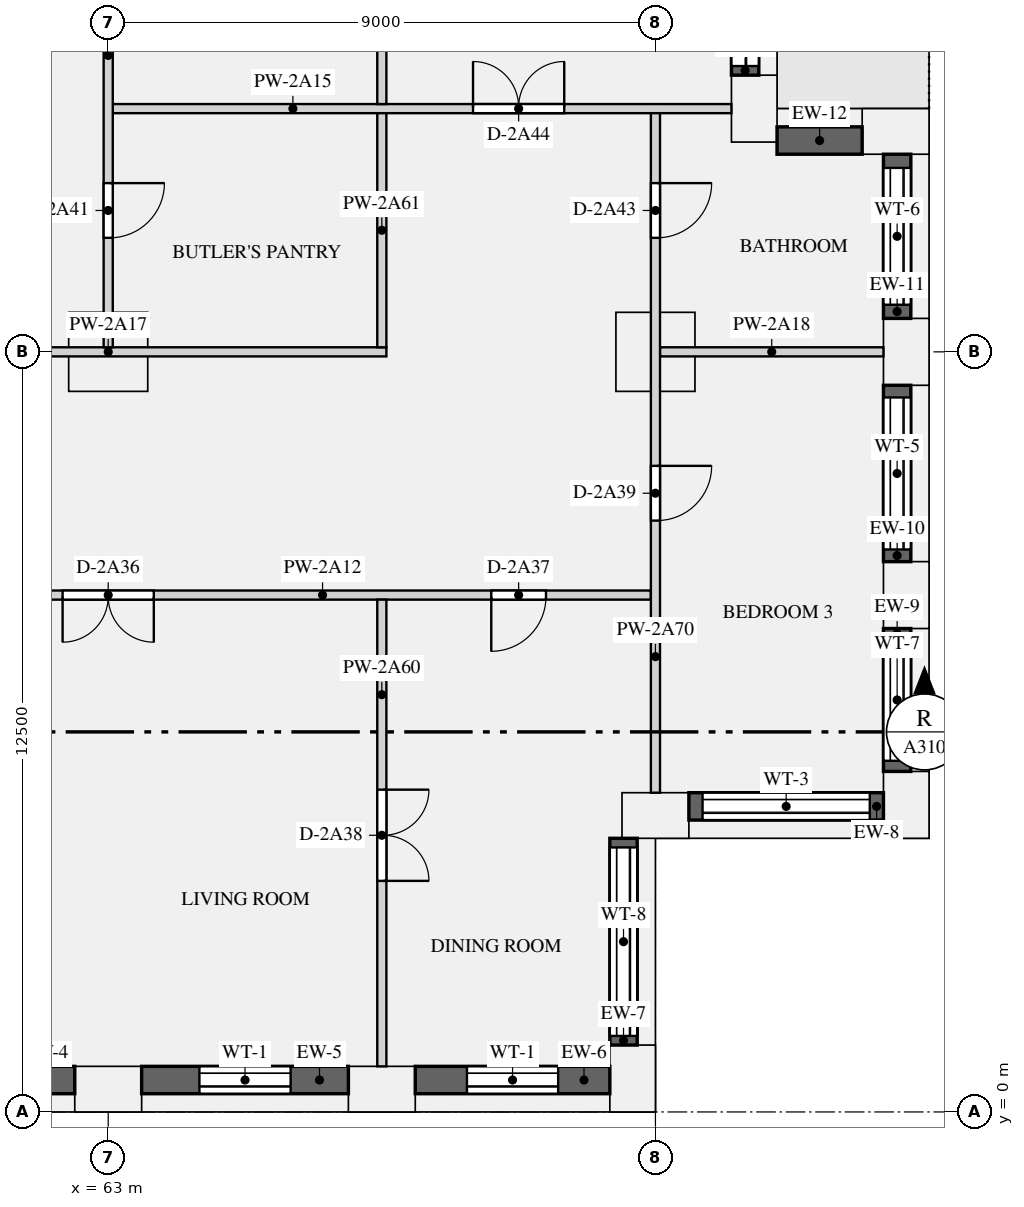
"""IFC4 building model, lengths in metres.
Left out: names, types, materials, properties, quantities, classifications, styles, units other than length and angle.
Written with IfcOpenShell. Run it as: python <this file> out.ifc"""

import sys

from ifc_helpers import new_model, si_unit, direction, frame, frame_2d, origin, origin_2d, place, context, subcontext, project, spatial, rectangle, extrude, element, fill, save


model = new_model("IFC4")
c1 = context("Model", 3, precision=1e-05, world=origin(), true_north=direction((0.0, 1.0)))
c2 = subcontext(c1, "Body", "Model", "MODEL_VIEW")
j1 = project(units=[si_unit("LENGTHUNIT", "METRE"), si_unit("PLANEANGLEUNIT", "RADIAN")], contexts=[c1])
p1 = place(None, origin())
s1 = spatial("IfcSite", under=j1, at=p1, CompositionType="ELEMENT")
p2 = place(p1, origin())
s2 = spatial("IfcBuilding", under=s1, at=p2, CompositionType="ELEMENT")
p3 = place(p2, frame((0.0, 0.0, 83.55)))
s3 = spatial("IfcBuildingStorey", under=s2, at=p3, CompositionType="ELEMENT", Elevation=83.55)
for number, where, z_axis, x_axis in (
    (1, (63.0, 0.375, 0.0), (0.0, 0.0, 1.0), (1.0, 0.0, 0.0)),
    (2, (67.5, 0.375, 0.0), (0.0, 0.0, 1.0), (1.0, 0.0, 0.0)),
    (3, (71.625, 0.55, 0.0), (0.0, 0.0, 1.0), (0.0, 1.0, 0.0)),
    (4, (72.0, 4.875, 0.0), (0.0, 0.0, 1.0), (1.0, 0.0, 0.0)),
    (5, (76.125, 5.05, 0.0), (0.0, 0.0, 1.0), (0.0, 1.0, 0.0)),
    (6, (76.125, 8.5, 0.0), (0.0, 0.0, 1.0), (0.0, 1.0, 0.0)),
    (7, (76.125, 12.5, 0.0), (0.0, 0.0, 1.0), (0.0, 1.0, 0.0)),
    (8, (75.95, 16.125, 0.0), (0.0, 0.0, 1.0), (-1.0, 0.0, 0.0)),
    (9, (73.625, 16.5, 0.0), (0.0, 0.0, 1.0), (0.0, 1.0, 0.0)),
):
    element("IfcColumn", number, at=place(p3, frame(where, z_axis=z_axis, x_axis=x_axis)), inside=s3, PredefinedType="USERDEFINED", context=c2, shape_type="SweptSolid", body=[
        extrude(rectangle(XDim=1.1, YDim=0.75, at=origin_2d()), origin(), (0.0, 0.0, 1.0), 3.15),
    ])
for number, where, z_axis, x_axis in (
    (10, (63.0, 12.5, 0.0), (0.0, 0.0, 1.0), (1.0, 0.0, 0.0)),
    (11, (72.0, 12.5, 0.0), (0.0, 0.0, 1.0), (1.0, 0.0, 0.0)),
):
    element("IfcColumn", number, at=place(p3, frame(where, z_axis=z_axis, x_axis=x_axis)), inside=s3, PredefinedType="COLUMN", context=c2, shape_type="SweptSolid", body=[
        extrude(rectangle(XDim=1.3, YDim=1.3, at=origin_2d()), origin(), (0.0, 0.0, 1.0), 3.15),
    ])
p4 = place(p3, frame((59.05, 0.525, 0.9), z_axis=(0.0, 0.0, 1.0), x_axis=(1.0, 0.0, 0.0)))
e12 = element("IfcWall", 12, at=p4, inside=s3, PredefinedType="SOLIDWALL", context=c2, shape_type="SweptSolid", body=[
    extrude(rectangle(XDim=3.4, YDim=0.45, at=frame_2d((1.7, 0.0))), origin(), (0.0, 0.0, 1.0), 1.93),
])
p5 = place(p4, frame((0.95, 0.0, 0.15)))
e13 = element("IfcOpeningElement", 13, at=p5, cuts=e12, PredefinedType="OPENING", context=c2, shape_type="SweptSolid", body=[
    extrude(rectangle(XDim=1.5, YDim=1.5, at=frame_2d((0.75, 0.75))), frame((0.0, 0.235, 0.0), z_axis=(0.0, -1.0, 0.0), x_axis=(1.0, 0.0, 0.0)), (0.0, 0.0, 1.0), 0.47),
])
p6 = place(p3, frame((63.55, 0.525, 0.9), z_axis=(0.0, 0.0, 1.0), x_axis=(1.0, 0.0, 0.0)))
e14 = element("IfcWall", 14, at=p6, inside=s3, PredefinedType="SOLIDWALL", context=c2, shape_type="SweptSolid", body=[
    extrude(rectangle(XDim=3.4, YDim=0.45, at=frame_2d((1.7, 0.0))), origin(), (0.0, 0.0, 1.0), 1.93),
])
p7 = place(p6, frame((0.95, 0.0, 0.15)))
e15 = element("IfcOpeningElement", 15, at=p7, cuts=e14, PredefinedType="OPENING", context=c2, shape_type="SweptSolid", body=[
    extrude(rectangle(XDim=1.5, YDim=1.5, at=frame_2d((0.75, 0.75))), frame((0.0, 0.235, 0.0), z_axis=(0.0, -1.0, 0.0), x_axis=(1.0, 0.0, 0.0)), (0.0, 0.0, 1.0), 0.47),
])
p8 = place(p3, frame((68.05, 0.525, 0.9), z_axis=(0.0, 0.0, 1.0), x_axis=(1.0, 0.0, 0.0)))
e16 = element("IfcWall", 16, at=p8, inside=s3, PredefinedType="SOLIDWALL", context=c2, shape_type="SweptSolid", body=[
    extrude(rectangle(XDim=3.2, YDim=0.45, at=frame_2d((1.6, 0.0))), origin(), (0.0, 0.0, 1.0), 1.93),
])
p9 = place(p8, frame((0.85, 0.0, 0.15)))
e17 = element("IfcOpeningElement", 17, at=p9, cuts=e16, PredefinedType="OPENING", context=c2, shape_type="SweptSolid", body=[
    extrude(rectangle(XDim=1.5, YDim=1.5, at=frame_2d((0.75, 0.75))), frame((0.0, 0.235, 0.0), z_axis=(0.0, -1.0, 0.0), x_axis=(1.0, 0.0, 0.0)), (0.0, 0.0, 1.0), 0.47),
])
p10 = place(p3, frame((71.475, 1.1, 0.9), z_axis=(0.0, 0.0, 1.0), x_axis=(0.0, 1.0, 0.0)))
e18 = element("IfcWall", 18, at=p10, inside=s3, PredefinedType="SOLIDWALL", context=c2, shape_type="SweptSolid", body=[
    extrude(rectangle(XDim=3.4, YDim=0.45, at=frame_2d((1.7, 0.0))), origin(), (0.0, 0.0, 1.0), 1.93),
])
p11 = place(p10, frame((0.15, 0.0, 0.15)))
e19 = element("IfcOpeningElement", 19, at=p11, cuts=e18, PredefinedType="OPENING", context=c2, shape_type="SweptSolid", body=[
    extrude(rectangle(XDim=3.1, YDim=1.5, at=frame_2d((1.55, 0.75))), frame((0.0, 0.235, 0.0), z_axis=(0.0, -1.0, 0.0), x_axis=(1.0, 0.0, 0.0)), (0.0, 0.0, 1.0), 0.47),
])
p12 = place(p3, frame((72.55, 5.025, 0.9), z_axis=(0.0, 0.0, 1.0), x_axis=(1.0, 0.0, 0.0)))
e20 = element("IfcWall", 20, at=p12, inside=s3, PredefinedType="SOLIDWALL", context=c2, shape_type="SweptSolid", body=[
    extrude(rectangle(XDim=3.2, YDim=0.45, at=frame_2d((1.6, 0.0))), origin(), (0.0, 0.0, 1.0), 1.93),
])
p13 = place(p12, frame((0.225, 0.0, 0.15)))
e21 = element("IfcOpeningElement", 21, at=p13, cuts=e20, PredefinedType="OPENING", context=c2, shape_type="SweptSolid", body=[
    extrude(rectangle(XDim=2.75, YDim=1.5, at=frame_2d((1.375, 0.75))), frame((0.0, 0.235, 0.0), z_axis=(0.0, -1.0, 0.0), x_axis=(1.0, 0.0, 0.0)), (0.0, 0.0, 1.0), 0.47),
])
p14 = place(p3, frame((75.975, 5.6, 0.9), z_axis=(0.0, 0.0, 1.0), x_axis=(0.0, 1.0, 0.0)))
e22 = element("IfcWall", 22, at=p14, inside=s3, PredefinedType="SOLIDWALL", context=c2, shape_type="SweptSolid", body=[
    extrude(rectangle(XDim=2.35, YDim=0.45, at=frame_2d((1.175, 0.0))), origin(), (0.0, 0.0, 1.0), 1.93),
])
p15 = place(p14, frame((0.175, 0.0, 0.15)))
e23 = element("IfcOpeningElement", 23, at=p15, cuts=e22, PredefinedType="OPENING", context=c2, shape_type="SweptSolid", body=[
    extrude(rectangle(XDim=2.0, YDim=1.5, at=frame_2d((1.0, 0.75))), frame((0.0, 0.235, 0.0), z_axis=(0.0, -1.0, 0.0), x_axis=(1.0, 0.0, 0.0)), (0.0, 0.0, 1.0), 0.47),
])
p16 = place(p3, frame((75.975, 9.05, 0.9), z_axis=(0.0, 0.0, 1.0), x_axis=(0.0, 1.0, 0.0)))
e24 = element("IfcWall", 24, at=p16, inside=s3, PredefinedType="SOLIDWALL", context=c2, shape_type="SweptSolid", body=[
    extrude(rectangle(XDim=2.9, YDim=0.45, at=frame_2d((1.45, 0.0))), origin(), (0.0, 0.0, 1.0), 1.93),
])
p17 = place(p16, frame((0.2, 0.0, 0.15)))
e25 = element("IfcOpeningElement", 25, at=p17, cuts=e24, PredefinedType="OPENING", context=c2, shape_type="SweptSolid", body=[
    extrude(rectangle(XDim=2.5, YDim=1.5, at=frame_2d((1.25, 0.75))), frame((0.0, 0.235, 0.0), z_axis=(0.0, -1.0, 0.0), x_axis=(1.0, 0.0, 0.0)), (0.0, 0.0, 1.0), 0.47),
])
p18 = place(p3, frame((75.975, 13.05, 0.9), z_axis=(0.0, 0.0, 1.0), x_axis=(0.0, 1.0, 0.0)))
e26 = element("IfcWall", 26, at=p18, inside=s3, PredefinedType="SOLIDWALL", context=c2, shape_type="SweptSolid", body=[
    extrude(rectangle(XDim=2.7, YDim=0.45, at=frame_2d((1.35, 0.0))), origin(), (0.0, 0.0, 1.0), 1.93),
])
p19 = place(p18, frame((0.225, 0.0, 0.15)))
e27 = element("IfcOpeningElement", 27, at=p19, cuts=e26, PredefinedType="OPENING", context=c2, shape_type="SweptSolid", body=[
    extrude(rectangle(XDim=2.25, YDim=1.5, at=frame_2d((1.125, 0.75))), frame((0.0, 0.235, 0.0), z_axis=(0.0, -1.0, 0.0), x_axis=(1.0, 0.0, 0.0)), (0.0, 0.0, 1.0), 0.47),
])
p20 = place(p3, frame((75.4, 15.975, 0.9), z_axis=(0.0, 0.0, 1.0), x_axis=(-1.0, 0.0, 0.0)))
e28 = element("IfcWall", 28, at=p20, inside=s3, PredefinedType="SOLIDWALL", context=c2, shape_type="SweptSolid", body=[
    extrude(rectangle(XDim=1.4, YDim=0.45, at=frame_2d((0.7, 0.0))), origin(), (0.0, 0.0, 1.0), 1.93),
])
p21 = place(p3, frame((73.475, 17.05, 0.0), z_axis=(0.0, 0.0, 1.0), x_axis=(0.0, 1.0, 0.0)))
e29 = element("IfcWall", 29, at=p21, inside=s3, PredefinedType="SOLIDWALL", context=c2, shape_type="SweptSolid", body=[
    extrude(rectangle(XDim=2.9, YDim=0.45, at=frame_2d((1.45, 0.0))), origin(), (0.0, 0.0, 1.0), 2.83),
])
p22 = place(p21, frame((0.15, 0.0, 0.0)))
e30 = element("IfcOpeningElement", 30, at=p22, cuts=e29, PredefinedType="OPENING", context=c2, shape_type="SweptSolid", body=[
    extrude(rectangle(XDim=2.6, YDim=2.3, at=frame_2d((1.3, 1.15))), frame((0.0, 0.235, 0.0), z_axis=(0.0, -1.0, 0.0), x_axis=(1.0, 0.0, 0.0)), (0.0, 0.0, 1.0), 0.47),
])
p23 = place(p3, frame((54.0, 8.5, 0.0), z_axis=(0.0, 0.0, 1.0), x_axis=(1.0, 0.0, 0.0)))
e31 = element("IfcWall", 31, at=p23, inside=s3, PredefinedType="PARTITIONING", context=c2, shape_type="SweptSolid", body=[
    extrude(rectangle(XDim=17.925, YDim=0.15, at=frame_2d((8.962, 0.0))), origin(), (0.0, 0.0, 1.0), 2.83),
])
p24 = place(p23, frame((1.8, 0.0, 0.0)))
e32 = element("IfcOpeningElement", 32, at=p24, cuts=e31, PredefinedType="OPENING", context=c2, shape_type="SweptSolid", body=[
    extrude(rectangle(XDim=0.9, YDim=2.1, at=frame_2d((0.45, 1.05))), frame((0.0, 0.085, 0.0), z_axis=(0.0, -1.0, 0.0), x_axis=(1.0, 0.0, 0.0)), (0.0, 0.0, 1.0), 0.17),
])
p25 = place(p23, frame((8.25, 0.0, 0.0)))
e33 = element("IfcOpeningElement", 33, at=p25, cuts=e31, PredefinedType="OPENING", context=c2, shape_type="SweptSolid", body=[
    extrude(rectangle(XDim=1.5, YDim=2.1, at=frame_2d((0.75, 1.05))), frame((0.0, 0.085, 0.0), z_axis=(0.0, -1.0, 0.0), x_axis=(1.0, 0.0, 0.0)), (0.0, 0.0, 1.0), 0.17),
])
p26 = place(p23, frame((15.3, 0.0, 0.0)))
e34 = element("IfcOpeningElement", 34, at=p26, cuts=e31, PredefinedType="OPENING", context=c2, shape_type="SweptSolid", body=[
    extrude(rectangle(XDim=0.9, YDim=2.1, at=frame_2d((0.45, 1.05))), frame((0.0, 0.085, 0.0), z_axis=(0.0, -1.0, 0.0), x_axis=(1.0, 0.0, 0.0)), (0.0, 0.0, 1.0), 0.17),
])
p27 = place(p3, frame((63.075, 16.5, 0.0), z_axis=(0.0, 0.0, 1.0), x_axis=(1.0, 0.0, 0.0)))
e35 = element("IfcWall", 35, at=p27, inside=s3, PredefinedType="PARTITIONING", context=c2, shape_type="SweptSolid", body=[
    extrude(rectangle(XDim=10.175, YDim=0.15, at=frame_2d((5.087, 0.0))), origin(), (0.0, 0.0, 1.0), 2.83),
])
p28 = place(p27, frame((5.925, 0.0, 0.0)))
e36 = element("IfcOpeningElement", 36, at=p28, cuts=e35, PredefinedType="OPENING", context=c2, shape_type="SweptSolid", body=[
    extrude(rectangle(XDim=1.5, YDim=2.1, at=frame_2d((0.75, 1.05))), frame((0.0, 0.085, 0.0), z_axis=(0.0, -1.0, 0.0), x_axis=(1.0, 0.0, 0.0)), (0.0, 0.0, 1.0), 0.17),
])
p29 = place(p3, frame((58.425, 12.5, 0.0), z_axis=(0.0, 0.0, 1.0), x_axis=(1.0, 0.0, 0.0)))
e37 = element("IfcWall", 37, at=p29, inside=s3, PredefinedType="PARTITIONING", context=c2, shape_type="SweptSolid", body=[
    extrude(rectangle(XDim=9.15, YDim=0.15, at=frame_2d((4.575, 0.0))), origin(), (0.0, 0.0, 1.0), 2.83),
])
p30 = place(p3, frame((72.075, 12.5, 0.0), z_axis=(0.0, 0.0, 1.0), x_axis=(1.0, 0.0, 0.0)))
e38 = element("IfcWall", 38, at=p30, inside=s3, PredefinedType="PARTITIONING", context=c2, shape_type="SweptSolid", body=[
    extrude(rectangle(XDim=3.675, YDim=0.15, at=frame_2d((1.837, 0.0))), origin(), (0.0, 0.0, 1.0), 2.83),
])
p31 = place(p3, frame((67.5, 0.75, 0.0), z_axis=(0.0, 0.0, 1.0), x_axis=(0.0, 1.0, 0.0)))
e39 = element("IfcWall", 39, at=p31, inside=s3, PredefinedType="PARTITIONING", context=c2, shape_type="SweptSolid", body=[
    extrude(rectangle(XDim=7.675, YDim=0.15, at=frame_2d((3.837, 0.0))), origin(), (0.0, 0.0, 1.0), 2.83),
])
p32 = place(p31, frame((3.05, 0.0, 0.0)))
e40 = element("IfcOpeningElement", 40, at=p32, cuts=e39, PredefinedType="OPENING", context=c2, shape_type="SweptSolid", body=[
    extrude(rectangle(XDim=1.5, YDim=2.1, at=frame_2d((0.75, 1.05))), frame((0.0, 0.085, 0.0), z_axis=(0.0, -1.0, 0.0), x_axis=(1.0, 0.0, 0.0)), (0.0, 0.0, 1.0), 0.17),
])
p33 = place(p3, frame((67.5, 12.575, 0.0), z_axis=(0.0, 0.0, 1.0), x_axis=(0.0, 1.0, 0.0)))
e41 = element("IfcWall", 41, at=p33, inside=s3, PredefinedType="PARTITIONING", context=c2, shape_type="SweptSolid", body=[
    extrude(rectangle(XDim=3.85, YDim=0.15, at=frame_2d((1.925, 0.0))), origin(), (0.0, 0.0, 1.0), 2.83),
])
p34 = place(p3, frame((67.5, 16.575, 0.0), z_axis=(0.0, 0.0, 1.0), x_axis=(0.0, 1.0, 0.0)))
e42 = element("IfcWall", 42, at=p34, inside=s3, PredefinedType="PARTITIONING", context=c2, shape_type="SweptSolid", body=[
    extrude(rectangle(XDim=7.85, YDim=0.15, at=frame_2d((3.925, 0.0))), origin(), (0.0, 0.0, 1.0), 2.83),
])
p35 = place(p3, frame((63.0, 12.575, 0.0), z_axis=(0.0, 0.0, 1.0), x_axis=(0.0, 1.0, 0.0)))
e43 = element("IfcWall", 43, at=p35, inside=s3, PredefinedType="PARTITIONING", context=c2, shape_type="SweptSolid", body=[
    extrude(rectangle(XDim=11.325, YDim=0.15, at=frame_2d((5.663, 0.0))), origin(), (0.0, 0.0, 1.0), 2.83),
])
p36 = place(p35, frame((1.8, 0.0, 0.0)))
e44 = element("IfcOpeningElement", 44, at=p36, cuts=e43, PredefinedType="OPENING", context=c2, shape_type="SweptSolid", body=[
    extrude(rectangle(XDim=0.9, YDim=2.1, at=frame_2d((0.45, 1.05))), frame((0.0, 0.085, 0.0), z_axis=(0.0, -1.0, 0.0), x_axis=(1.0, 0.0, 0.0)), (0.0, 0.0, 1.0), 0.17),
])
p37 = place(p35, frame((6.9, 0.0, 0.0)))
e45 = element("IfcOpeningElement", 45, at=p37, cuts=e43, PredefinedType="OPENING", context=c2, shape_type="SweptSolid", body=[
    extrude(rectangle(XDim=0.9, YDim=2.1, at=frame_2d((0.45, 1.05))), frame((0.0, 0.085, 0.0), z_axis=(0.0, -1.0, 0.0), x_axis=(1.0, 0.0, 0.0)), (0.0, 0.0, 1.0), 0.17),
])
p38 = place(p3, frame((72.0, 5.25, 0.0), z_axis=(0.0, 0.0, 1.0), x_axis=(0.0, 1.0, 0.0)))
e46 = element("IfcWall", 46, at=p38, inside=s3, PredefinedType="PARTITIONING", context=c2, shape_type="SweptSolid", body=[
    extrude(rectangle(XDim=11.175, YDim=0.15, at=frame_2d((5.587, 0.0))), origin(), (0.0, 0.0, 1.0), 2.83),
])
p39 = place(p38, frame((4.475, 0.0, 0.0)))
e47 = element("IfcOpeningElement", 47, at=p39, cuts=e46, PredefinedType="OPENING", context=c2, shape_type="SweptSolid", body=[
    extrude(rectangle(XDim=0.9, YDim=2.1, at=frame_2d((0.45, 1.05))), frame((0.0, 0.085, 0.0), z_axis=(0.0, -1.0, 0.0), x_axis=(1.0, 0.0, 0.0)), (0.0, 0.0, 1.0), 0.17),
])
p40 = place(p38, frame((9.125, 0.0, 0.0)))
e48 = element("IfcOpeningElement", 48, at=p40, cuts=e46, PredefinedType="OPENING", context=c2, shape_type="SweptSolid", body=[
    extrude(rectangle(XDim=0.9, YDim=2.1, at=frame_2d((0.45, 1.05))), frame((0.0, 0.085, 0.0), z_axis=(0.0, -1.0, 0.0), x_axis=(1.0, 0.0, 0.0)), (0.0, 0.0, 1.0), 0.17),
])
p41 = place(p7, origin())
e49 = element("IfcWindow", 49, at=p41, inside=s3, PartitioningType="SINGLE_PANEL", PredefinedType="WINDOW", context=c2, shape_type="SweptSolid", body=[
    extrude(rectangle(XDim=1.5, YDim=1.5, at=frame_2d((0.75, 0.75))), frame((0.0, -0.065, 0.0), z_axis=(0.0, -1.0, 0.0), x_axis=(1.0, 0.0, 0.0)), (0.0, 0.0, 1.0), 0.06),
])
fill(e15, e49)
p42 = place(p9, origin())
e50 = element("IfcWindow", 50, at=p42, inside=s3, PartitioningType="SINGLE_PANEL", PredefinedType="WINDOW", context=c2, shape_type="SweptSolid", body=[
    extrude(rectangle(XDim=1.5, YDim=1.5, at=frame_2d((0.75, 0.75))), frame((0.0, -0.065, 0.0), z_axis=(0.0, -1.0, 0.0), x_axis=(1.0, 0.0, 0.0)), (0.0, 0.0, 1.0), 0.06),
])
fill(e17, e50)
p43 = place(p11, origin())
e51 = element("IfcWindow", 51, at=p43, inside=s3, PartitioningType="SINGLE_PANEL", PredefinedType="WINDOW", context=c2, shape_type="SweptSolid", body=[
    extrude(rectangle(XDim=3.1, YDim=1.5, at=frame_2d((1.55, 0.75))), frame((0.0, -0.065, 0.0), z_axis=(0.0, -1.0, 0.0), x_axis=(1.0, 0.0, 0.0)), (0.0, 0.0, 1.0), 0.06),
])
fill(e19, e51)
p44 = place(p13, origin())
e52 = element("IfcWindow", 52, at=p44, inside=s3, PartitioningType="SINGLE_PANEL", PredefinedType="WINDOW", context=c2, shape_type="SweptSolid", body=[
    extrude(rectangle(XDim=2.75, YDim=1.5, at=frame_2d((1.375, 0.75))), frame((0.0, -0.065, 0.0), z_axis=(0.0, -1.0, 0.0), x_axis=(1.0, 0.0, 0.0)), (0.0, 0.0, 1.0), 0.06),
])
fill(e21, e52)
p45 = place(p15, origin())
e53 = element("IfcWindow", 53, at=p45, inside=s3, PartitioningType="SINGLE_PANEL", PredefinedType="WINDOW", context=c2, shape_type="SweptSolid", body=[
    extrude(rectangle(XDim=2.0, YDim=1.5, at=frame_2d((1.0, 0.75))), frame((0.0, -0.065, 0.0), z_axis=(0.0, -1.0, 0.0), x_axis=(1.0, 0.0, 0.0)), (0.0, 0.0, 1.0), 0.06),
])
fill(e23, e53)
p46 = place(p17, origin())
e54 = element("IfcWindow", 54, at=p46, inside=s3, PartitioningType="SINGLE_PANEL", PredefinedType="WINDOW", context=c2, shape_type="SweptSolid", body=[
    extrude(rectangle(XDim=2.5, YDim=1.5, at=frame_2d((1.25, 0.75))), frame((0.0, -0.065, 0.0), z_axis=(0.0, -1.0, 0.0), x_axis=(1.0, 0.0, 0.0)), (0.0, 0.0, 1.0), 0.06),
])
fill(e25, e54)
p47 = place(p19, origin())
e55 = element("IfcWindow", 55, at=p47, inside=s3, PartitioningType="SINGLE_PANEL", PredefinedType="WINDOW", context=c2, shape_type="SweptSolid", body=[
    extrude(rectangle(XDim=2.25, YDim=1.5, at=frame_2d((1.125, 0.75))), frame((0.0, -0.065, 0.0), z_axis=(0.0, -1.0, 0.0), x_axis=(1.0, 0.0, 0.0)), (0.0, 0.0, 1.0), 0.06),
])
fill(e27, e55)
p48 = place(p22, origin())
e56 = element("IfcDoor", 56, at=p48, inside=s3, OperationType="SLIDING_TO_LEFT", PredefinedType="DOOR", context=c2, shape_type="SweptSolid", body=[
    extrude(rectangle(XDim=2.6, YDim=2.3, at=frame_2d((1.3, 1.15))), frame((0.0, -0.07, 0.0), z_axis=(0.0, -1.0, 0.0), x_axis=(1.0, 0.0, 0.0)), (0.0, 0.0, 1.0), 0.05),
])
fill(e30, e56)
p49 = place(p25, frame((1.5, 0.0, 0.0), z_axis=(0.0, 0.0, 1.0), x_axis=(-1.0, 0.0, 0.0)))
e57 = element("IfcDoor", 57, at=p49, inside=s3, OperationType="DOUBLE_DOOR_SINGLE_SWING", PredefinedType="DOOR", context=c2, shape_type="SweptSolid", body=[
    extrude(rectangle(XDim=1.5, YDim=2.1, at=frame_2d((0.75, 1.05))), frame((0.0, 0.025, 0.0), z_axis=(0.0, -1.0, 0.0), x_axis=(1.0, 0.0, 0.0)), (0.0, 0.0, 1.0), 0.05),
])
fill(e33, e57)
p50 = place(p26, frame((0.9, 0.0, 0.0), z_axis=(0.0, 0.0, 1.0), x_axis=(-1.0, 0.0, 0.0)))
e58 = element("IfcDoor", 58, at=p50, inside=s3, OperationType="SINGLE_SWING_RIGHT", PredefinedType="DOOR", context=c2, shape_type="SweptSolid", body=[
    extrude(rectangle(XDim=0.9, YDim=2.1, at=frame_2d((0.45, 1.05))), frame((0.0, 0.025, 0.0), z_axis=(0.0, -1.0, 0.0), x_axis=(1.0, 0.0, 0.0)), (0.0, 0.0, 1.0), 0.05),
])
fill(e34, e58)
p51 = place(p32, frame((1.5, 0.0, 0.0), z_axis=(0.0, 0.0, 1.0), x_axis=(-1.0, 0.0, 0.0)))
e59 = element("IfcDoor", 59, at=p51, inside=s3, OperationType="DOUBLE_DOOR_SINGLE_SWING", PredefinedType="DOOR", context=c2, shape_type="SweptSolid", body=[
    extrude(rectangle(XDim=1.5, YDim=2.1, at=frame_2d((0.75, 1.05))), frame((0.0, 0.025, 0.0), z_axis=(0.0, -1.0, 0.0), x_axis=(1.0, 0.0, 0.0)), (0.0, 0.0, 1.0), 0.05),
])
fill(e40, e59)
p52 = place(p39, frame((0.9, 0.0, 0.0), z_axis=(0.0, 0.0, 1.0), x_axis=(-1.0, 0.0, 0.0)))
e60 = element("IfcDoor", 60, at=p52, inside=s3, OperationType="SINGLE_SWING_LEFT", PredefinedType="DOOR", context=c2, shape_type="SweptSolid", body=[
    extrude(rectangle(XDim=0.9, YDim=2.1, at=frame_2d((0.45, 1.05))), frame((0.0, 0.025, 0.0), z_axis=(0.0, -1.0, 0.0), x_axis=(1.0, 0.0, 0.0)), (0.0, 0.0, 1.0), 0.05),
])
fill(e47, e60)
p53 = place(p36, frame((0.9, 0.0, 0.0), z_axis=(0.0, 0.0, 1.0), x_axis=(-1.0, 0.0, 0.0)))
e61 = element("IfcDoor", 61, at=p53, inside=s3, OperationType="SINGLE_SWING_LEFT", PredefinedType="DOOR", context=c2, shape_type="SweptSolid", body=[
    extrude(rectangle(XDim=0.9, YDim=2.1, at=frame_2d((0.45, 1.05))), frame((0.0, 0.025, 0.0), z_axis=(0.0, -1.0, 0.0), x_axis=(1.0, 0.0, 0.0)), (0.0, 0.0, 1.0), 0.05),
])
fill(e44, e61)
p54 = place(p40, frame((0.9, 0.0, 0.0), z_axis=(0.0, 0.0, 1.0), x_axis=(-1.0, 0.0, 0.0)))
e62 = element("IfcDoor", 62, at=p54, inside=s3, OperationType="SINGLE_SWING_LEFT", PredefinedType="DOOR", context=c2, shape_type="SweptSolid", body=[
    extrude(rectangle(XDim=0.9, YDim=2.1, at=frame_2d((0.45, 1.05))), frame((0.0, 0.025, 0.0), z_axis=(0.0, -1.0, 0.0), x_axis=(1.0, 0.0, 0.0)), (0.0, 0.0, 1.0), 0.05),
])
fill(e48, e62)
p55 = place(p28, origin())
e63 = element("IfcDoor", 63, at=p55, inside=s3, OperationType="DOUBLE_DOOR_SINGLE_SWING", PredefinedType="DOOR", context=c2, shape_type="SweptSolid", body=[
    extrude(rectangle(XDim=1.5, YDim=2.1, at=frame_2d((0.75, 1.05))), frame((0.0, 0.025, 0.0), z_axis=(0.0, -1.0, 0.0), x_axis=(1.0, 0.0, 0.0)), (0.0, 0.0, 1.0), 0.05),
])
fill(e36, e63)
save(model, sys.argv[1])
